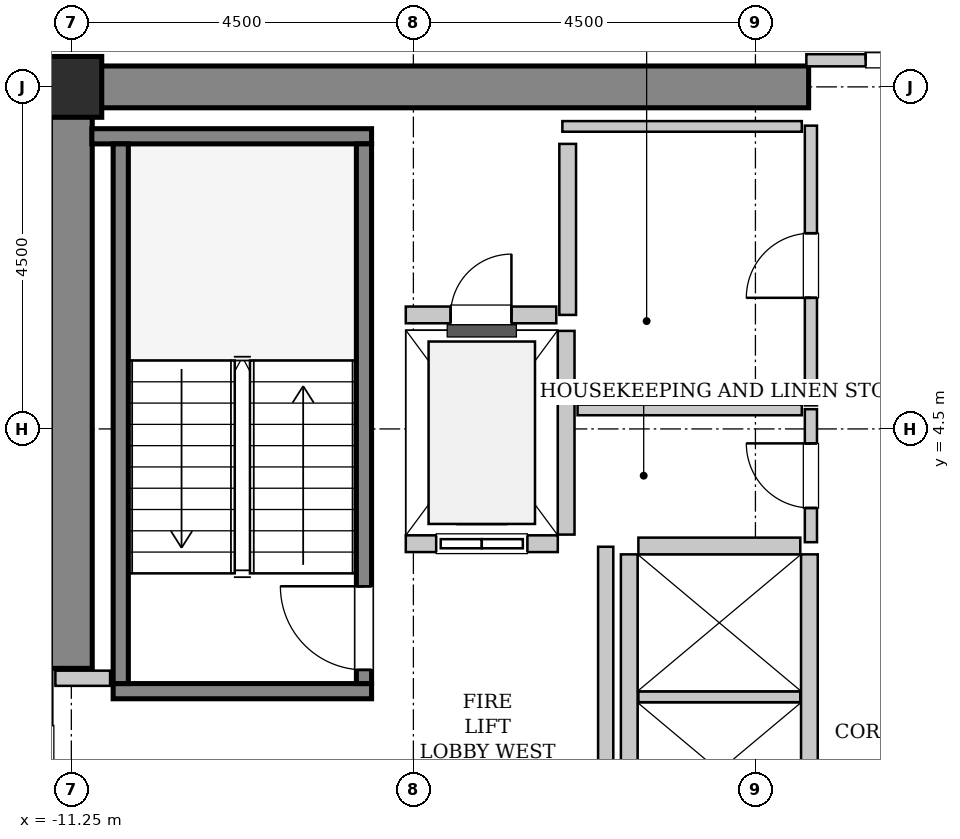
"""IFC4 building model, lengths in metres.
Left out: names, types, materials, properties, quantities, classifications, styles, units other than length and angle.
Written with IfcOpenShell. Run it as: python <this file> out.ifc"""

import sys

from ifc_helpers import new_model, si_unit, direction, frame, frame_2d, origin, origin_2d, place, context, subcontext, project, spatial, rectangle, hollow_rectangle, extrude, source, transform, mapped, element, fill, save


model = new_model("IFC4")
c1 = context("Model", 3, precision=1e-05, world=origin(), true_north=direction((0.0, 1.0)))
c2 = subcontext(c1, "Body", "Model", "MODEL_VIEW")
j1 = project(units=[si_unit("LENGTHUNIT", "METRE"), si_unit("PLANEANGLEUNIT", "RADIAN")], contexts=[c1])
p1 = place(None, origin())
s1 = spatial("IfcSite", under=j1, at=p1, CompositionType="ELEMENT")
p2 = place(p1, origin())
s2 = spatial("IfcBuilding", under=s1, at=p2, CompositionType="ELEMENT")
p3 = place(p2, frame((0.0, 0.0, 186.8)))
s3 = spatial("IfcBuildingStorey", under=s2, at=p3, CompositionType="ELEMENT", Elevation=186.8)
m1 = source(origin(), c2, "Body", "SweptSolid", [
    extrude(rectangle(XDim=9.975, YDim=0.55, at=frame_2d((4.987, 0.0))), origin(), (0.0, 0.0, 1.0), 3.8),
])
p4 = place(p3, frame((-11.525, 9.0, 0.0), z_axis=(0.0, 0.0, 1.0), x_axis=(1.0, 0.0, 0.0)))
e1 = element("IfcWall", 1, at=p4, inside=s3, PredefinedType="SHEAR", context=c2, shape_type="MappedRepresentation", body=[
    mapped(m1, transform((0.0, 0.0, 0.0), x_axis=(1.0, 0.0, 0.0), y_axis=(0.0, 1.0, 0.0), z_axis=(0.0, 0.0, 1.0), scale=1.0)),
])
m2 = source(origin(), c2, "Body", "SweptSolid", [
    extrude(rectangle(XDim=7.375, YDim=0.55, at=frame_2d((3.688, 0.0))), origin(), (0.0, 0.0, 1.0), 3.8),
])
p5 = place(p3, frame((-11.25, 1.35, 0.0), z_axis=(0.0, 0.0, 1.0), x_axis=(0.0, 1.0, 0.0)))
e2 = element("IfcWall", 2, at=p5, inside=s3, PredefinedType="SHEAR", context=c2, shape_type="MappedRepresentation", body=[
    mapped(m2, transform((0.0, 0.0, 0.0), x_axis=(1.0, 0.0, 0.0), y_axis=(0.0, 1.0, 0.0), z_axis=(0.0, 0.0, 1.0), scale=1.0)),
])
m3 = source(origin(), c2, "Body", "SweptSolid", [
    extrude(hollow_rectangle(XDim=0.8, YDim=0.8, WallThickness=0.04, InnerFilletRadius=0.04, OuterFilletRadius=0.08, at=origin_2d()), origin(), (0.0, 0.0, 1.0), 3.8),
])
p6 = place(p3, frame((-11.25, 9.0, 0.0), z_axis=(0.0, 0.0, 1.0), x_axis=(1.0, 0.0, 0.0)))
e3 = element("IfcColumn", 3, at=p6, inside=s3, PredefinedType="COLUMN", context=c2, shape_type="MappedRepresentation", body=[
    mapped(m3, transform((0.0, 0.0, 0.0), x_axis=(1.0, 0.0, 0.0), y_axis=(0.0, 1.0, 0.0), z_axis=(0.0, 0.0, 1.0), scale=1.0)),
])
m4 = source(origin(), c2, "Body", "SweptSolid", [
    extrude(rectangle(XDim=3.4, YDim=0.2, at=frame_2d((1.7, 0.0))), origin(), (0.0, 0.0, 1.0), 3.8),
])
p7 = place(p3, frame((-7.3, 1.05, 0.0), z_axis=(0.0, 0.0, 1.0), x_axis=(-1.0, 0.0, 0.0)))
e4 = element("IfcWall", 4, at=p7, inside=s3, PredefinedType="SOLIDWALL", context=c2, shape_type="MappedRepresentation", body=[
    mapped(m4, transform((0.0, 0.0, 0.0), x_axis=(1.0, 0.0, 0.0), y_axis=(0.0, 1.0, 0.0), z_axis=(0.0, 0.0, 1.0), scale=1.0)),
])
m5 = source(origin(), c2, "Body", "SweptSolid", [
    extrude(rectangle(XDim=3.68, YDim=0.2, at=frame_2d((1.84, 0.0))), origin(), (0.0, 0.0, 1.0), 3.8),
])
p8 = place(p3, frame((-7.3, 8.35, 0.0), z_axis=(0.0, 0.0, 1.0), x_axis=(-1.0, 0.0, 0.0)))
e5 = element("IfcWall", 5, at=p8, inside=s3, PredefinedType="SOLIDWALL", context=c2, shape_type="MappedRepresentation", body=[
    mapped(m5, transform((0.0, 0.0, 0.0), x_axis=(1.0, 0.0, 0.0), y_axis=(0.0, 1.0, 0.0), z_axis=(0.0, 0.0, 1.0), scale=1.0)),
])
m6 = source(origin(), c2, "Body", "SweptSolid", [
    extrude(rectangle(XDim=7.1, YDim=0.2, at=frame_2d((3.55, 0.0))), origin(), (0.0, 0.0, 1.0), 3.8),
])
p9 = place(p3, frame((-7.4, 1.15, 0.0), z_axis=(0.0, 0.0, 1.0), x_axis=(0.0, 1.0, 0.0)))
e6 = element("IfcWall", 6, at=p9, inside=s3, PredefinedType="SOLIDWALL", context=c2, shape_type="MappedRepresentation", body=[
    mapped(m6, transform((0.0, 0.0, 0.0), x_axis=(1.0, 0.0, 0.0), y_axis=(0.0, 1.0, 0.0), z_axis=(0.0, 0.0, 1.0), scale=1.0)),
])
p10 = place(p9, frame((0.18, 0.0, 0.0)))
e7 = element("IfcOpeningElement", 7, at=p10, cuts=e6, PredefinedType="OPENING", context=c2, shape_type="SweptSolid", body=[
    extrude(rectangle(XDim=1.1, YDim=2.15, at=frame_2d((0.55, 1.075))), frame((0.0, 0.11, 0.0), z_axis=(0.0, -1.0, 0.0), x_axis=(1.0, 0.0, 0.0)), (0.0, 0.0, 1.0), 0.22),
])
p11 = place(p3, frame((-10.6, 1.15, 0.0), z_axis=(0.0, 0.0, 1.0), x_axis=(0.0, 1.0, 0.0)))
e8 = element("IfcWall", 8, at=p11, inside=s3, PredefinedType="SOLIDWALL", context=c2, shape_type="MappedRepresentation", body=[
    mapped(m6, transform((0.0, 0.0, 0.0), x_axis=(1.0, 0.0, 0.0), y_axis=(0.0, 1.0, 0.0), z_axis=(0.0, 0.0, 1.0), scale=1.0)),
])
m7 = source(origin(), c2, "Body", "SweptSolid", [
    extrude(rectangle(XDim=2.0, YDim=0.22, at=frame_2d((1.0, 0.0))), origin(), (0.0, 0.0, 1.0), 3.535),
])
p12 = place(p3, frame((-6.85, 2.99, 0.0), z_axis=(0.0, 0.0, 1.0), x_axis=(1.0, 0.0, 0.0)))
e9 = element("IfcWall", 9, at=p12, inside=s3, PredefinedType="SOLIDWALL", context=c2, shape_type="MappedRepresentation", body=[
    mapped(m7, transform((0.0, 0.0, 0.0), x_axis=(1.0, 0.0, 0.0), y_axis=(0.0, 1.0, 0.0), z_axis=(0.0, 0.0, 1.0), scale=1.0)),
])
p13 = place(p12, frame((0.4, 0.0, 0.0)))
e10 = element("IfcOpeningElement", 10, at=p13, cuts=e9, PredefinedType="OPENING", context=c2, shape_type="SweptSolid", body=[
    extrude(rectangle(XDim=1.2, YDim=2.2, at=frame_2d((0.6, 1.1))), frame((0.0, 0.12, 0.0), z_axis=(0.0, -1.0, 0.0), x_axis=(1.0, 0.0, 0.0)), (0.0, 0.0, 1.0), 0.24),
])
m8 = source(origin(), c2, "Body", "SweptSolid", [
    extrude(rectangle(XDim=2.68, YDim=0.22, at=frame_2d((1.34, 0.0))), origin(), (0.0, 0.0, 1.0), 3.535),
])
p14 = place(p3, frame((-4.74, 3.11, 0.0), z_axis=(0.0, 0.0, 1.0), x_axis=(0.0, 1.0, 0.0)))
e11 = element("IfcWall", 11, at=p14, inside=s3, PredefinedType="SOLIDWALL", context=c2, shape_type="MappedRepresentation", body=[
    mapped(m8, transform((0.0, 0.0, 0.0), x_axis=(1.0, 0.0, 0.0), y_axis=(0.0, 1.0, 0.0), z_axis=(0.0, 0.0, 1.0), scale=1.0)),
])
m9 = source(origin(), c2, "Body", "SweptSolid", [
    extrude(rectangle(XDim=5.7, YDim=0.22, at=frame_2d((2.85, 0.0))), origin(), (0.0, 0.0, 1.0), 3.535),
])
for number, where, z_axis, x_axis in (
    (12, (-1.54, -2.85, 0.0), (0.0, 0.0, 1.0), (0.0, 1.0, 0.0)),
    (13, (-3.91, 2.85, 0.0), (0.0, 0.0, 1.0), (0.0, -1.0, 0.0)),
):
    element("IfcWall", number, at=place(p3, frame(where, z_axis=z_axis, x_axis=x_axis)), inside=s3, PredefinedType="SOLIDWALL", context=c2, shape_type="MappedRepresentation", body=[
        mapped(m9, transform((0.0, 0.0, 0.0), x_axis=(1.0, 0.0, 0.0), y_axis=(0.0, 1.0, 0.0), z_axis=(0.0, 0.0, 1.0), scale=1.0)),
    ])
m10 = source(origin(), c2, "Body", "SweptSolid", [
    extrude(rectangle(XDim=2.13, YDim=0.14, at=frame_2d((1.065, 0.0))), origin(), (0.0, 0.0, 1.0), 3.535),
])
p15 = place(p3, frame((-3.79, 0.975, 0.0), z_axis=(0.0, 0.0, 1.0), x_axis=(1.0, 0.0, 0.0)))
e14 = element("IfcWall", 14, at=p15, inside=s3, PredefinedType="PARTITIONING", context=c2, shape_type="MappedRepresentation", body=[
    mapped(m10, transform((0.0, 0.0, 0.0), x_axis=(1.0, 0.0, 0.0), y_axis=(0.0, 1.0, 0.0), z_axis=(0.0, 0.0, 1.0), scale=1.0)),
])
m11 = source(origin(), c2, "Body", "SweptSolid", [
    extrude(rectangle(XDim=2.13, YDim=0.22, at=frame_2d((1.065, 0.0))), origin(), (0.0, 0.0, 1.0), 3.535),
])
p16 = place(p3, frame((-1.66, 2.96, 0.0), z_axis=(0.0, 0.0, 1.0), x_axis=(-1.0, 0.0, 0.0)))
e15 = element("IfcWall", 15, at=p16, inside=s3, PredefinedType="SOLIDWALL", context=c2, shape_type="MappedRepresentation", body=[
    mapped(m11, transform((0.0, 0.0, 0.0), x_axis=(1.0, 0.0, 0.0), y_axis=(0.0, 1.0, 0.0), z_axis=(0.0, 0.0, 1.0), scale=1.0)),
])
m12 = source(origin(), c2, "Body", "SweptSolid", [
    extrude(rectangle(XDim=2.25, YDim=0.22, at=frame_2d((1.125, 0.0))), origin(), (0.0, 0.0, 1.0), 3.535),
])
p17 = place(p3, frame((-4.72, 6.0, 0.0), z_axis=(0.0, 0.0, 1.0), x_axis=(0.0, 1.0, 0.0)))
e16 = element("IfcWall", 16, at=p17, inside=s3, PredefinedType="SOLIDWALL", context=c2, shape_type="MappedRepresentation", body=[
    mapped(m12, transform((0.0, 0.0, 0.0), x_axis=(1.0, 0.0, 0.0), y_axis=(0.0, 1.0, 0.0), z_axis=(0.0, 0.0, 1.0), scale=1.0)),
])
m13 = source(origin(), c2, "Body", "SweptSolid", [
    extrude(rectangle(XDim=1.98, YDim=0.22, at=frame_2d((0.99, 0.0))), origin(), (0.0, 0.0, 1.0), 3.535),
])
p18 = place(p3, frame((-6.85, 6.0, 0.0), z_axis=(0.0, 0.0, 1.0), x_axis=(1.0, 0.0, 0.0)))
e17 = element("IfcWall", 17, at=p18, inside=s3, PredefinedType="SOLIDWALL", context=c2, shape_type="MappedRepresentation", body=[
    mapped(m13, transform((0.0, 0.0, 0.0), x_axis=(1.0, 0.0, 0.0), y_axis=(0.0, 1.0, 0.0), z_axis=(0.0, 0.0, 1.0), scale=1.0)),
])
p19 = place(p18, frame((0.59, 0.0, 0.0)))
e18 = element("IfcOpeningElement", 18, at=p19, cuts=e17, PredefinedType="OPENING", context=c2, shape_type="SweptSolid", body=[
    extrude(rectangle(XDim=0.8, YDim=2.0, at=frame_2d((0.4, 1.0))), frame((0.0, 0.12, 0.0), z_axis=(0.0, -1.0, 0.0), x_axis=(1.0, 0.0, 0.0)), (0.0, 0.0, 1.0), 0.24),
])
m14 = source(origin(), c2, "Body", "SweptSolid", [
    extrude(rectangle(XDim=5.9, YDim=0.2, at=frame_2d((2.95, 0.0))), origin(), (0.0, 0.0, 1.0), 3.535),
])
p20 = place(p3, frame((-4.22, -2.95, 0.0), z_axis=(0.0, 0.0, 1.0), x_axis=(0.0, 1.0, 0.0)))
e19 = element("IfcWall", 19, at=p20, inside=s3, PredefinedType="PARTITIONING", context=c2, shape_type="MappedRepresentation", body=[
    mapped(m14, transform((0.0, 0.0, 0.0), x_axis=(1.0, 0.0, 0.0), y_axis=(0.0, 1.0, 0.0), z_axis=(0.0, 0.0, 1.0), scale=1.0)),
])
m15 = source(origin(), c2, "Body", "SweptSolid", [
    extrude(rectangle(XDim=0.72, YDim=0.2, at=frame_2d((0.36, 0.0))), origin(), (0.0, 0.0, 1.0), 3.535),
])
p21 = place(p3, frame((-11.46, 1.22, 0.0), z_axis=(0.0, 0.0, 1.0), x_axis=(1.0, 0.0, 0.0)))
e20 = element("IfcWall", 20, at=p21, inside=s3, PredefinedType="PARTITIONING", context=c2, shape_type="MappedRepresentation", body=[
    mapped(m15, transform((0.0, 0.0, 0.0), x_axis=(1.0, 0.0, 0.0), y_axis=(0.0, 1.0, 0.0), z_axis=(0.0, 0.0, 1.0), scale=1.0)),
])
m16 = source(origin(), c2, "Body", "SweptSolid", [
    extrude(rectangle(XDim=3.16, YDim=0.16, at=frame_2d((1.58, 0.0))), origin(), (0.0, 0.0, 1.0), 2.425),
])
p22 = place(p3, frame((-1.58, 9.35, 0.0), z_axis=(0.0, 0.0, 1.0), x_axis=(1.0, 0.0, 0.0)))
e21 = element("IfcWall", 21, at=p22, inside=s3, PredefinedType="PARTITIONING", context=c2, shape_type="MappedRepresentation", body=[
    mapped(m16, transform((0.0, 0.0, 0.0), x_axis=(1.0, 0.0, 0.0), y_axis=(0.0, 1.0, 0.0), z_axis=(0.0, 0.0, 1.0), scale=1.0)),
])
p23 = place(p22, frame((0.78, 0.0, 0.0)))
e22 = element("IfcOpeningElement", 22, at=p23, cuts=e21, PredefinedType="OPENING", context=c2, shape_type="SweptSolid", body=[
    extrude(rectangle(XDim=1.6, YDim=2.3, at=frame_2d((0.8, 1.15))), frame((0.0, 0.09, 0.0), z_axis=(0.0, -1.0, 0.0), x_axis=(1.0, 0.0, 0.0)), (0.0, 0.0, 1.0), 0.18),
])
m17 = source(origin(), c2, "Body", "SweptSolid", [
    extrude(rectangle(XDim=1.75, YDim=0.16, at=frame_2d((0.875, 0.0))), origin(), (0.0, 0.0, 1.0), 3.535),
])
p24 = place(p3, frame((-1.52, 3.01, 0.0), z_axis=(0.0, 0.0, 1.0), x_axis=(0.0, 1.0, 0.0)))
e23 = element("IfcWall", 23, at=p24, inside=s3, PredefinedType="PARTITIONING", context=c2, shape_type="MappedRepresentation", body=[
    mapped(m17, transform((0.0, 0.0, 0.0), x_axis=(1.0, 0.0, 0.0), y_axis=(0.0, 1.0, 0.0), z_axis=(0.0, 0.0, 1.0), scale=1.0)),
])
p25 = place(p24, frame((0.45, 0.0, 0.0)))
e24 = element("IfcOpeningElement", 24, at=p25, cuts=e23, PredefinedType="OPENING", context=c2, shape_type="SweptSolid", body=[
    extrude(rectangle(XDim=0.85, YDim=2.1, at=frame_2d((0.425, 1.05))), frame((0.0, 0.09, 0.0), z_axis=(0.0, -1.0, 0.0), x_axis=(1.0, 0.0, 0.0)), (0.0, 0.0, 1.0), 0.18),
])
m18 = source(origin(), c2, "Body", "SweptSolid", [
    extrude(rectangle(XDim=2.95, YDim=0.14, at=frame_2d((1.475, 0.0))), origin(), (0.0, 0.0, 1.0), 3.535),
])
p26 = place(p3, frame((-4.59, 4.75, 0.0), z_axis=(0.0, 0.0, 1.0), x_axis=(1.0, 0.0, 0.0)))
e25 = element("IfcWall", 25, at=p26, inside=s3, PredefinedType="PARTITIONING", context=c2, shape_type="MappedRepresentation", body=[
    mapped(m18, transform((0.0, 0.0, 0.0), x_axis=(1.0, 0.0, 0.0), y_axis=(0.0, 1.0, 0.0), z_axis=(0.0, 0.0, 1.0), scale=1.0)),
])
m19 = source(origin(), c2, "Body", "SweptSolid", [
    extrude(rectangle(XDim=3.68, YDim=0.16, at=frame_2d((1.84, 0.0))), origin(), (0.0, 0.0, 1.0), 3.535),
])
p27 = place(p3, frame((-1.52, 4.81, 0.0), z_axis=(0.0, 0.0, 1.0), x_axis=(0.0, 1.0, 0.0)))
e26 = element("IfcWall", 26, at=p27, inside=s3, PredefinedType="PARTITIONING", context=c2, shape_type="MappedRepresentation", body=[
    mapped(m19, transform((0.0, 0.0, 0.0), x_axis=(1.0, 0.0, 0.0), y_axis=(0.0, 1.0, 0.0), z_axis=(0.0, 0.0, 1.0), scale=1.0)),
])
p28 = place(p27, frame((1.415, 0.0, 0.0)))
e27 = element("IfcOpeningElement", 27, at=p28, cuts=e26, PredefinedType="OPENING", context=c2, shape_type="SweptSolid", body=[
    extrude(rectangle(XDim=0.85, YDim=2.1, at=frame_2d((0.425, 1.05))), frame((0.0, 0.09, 0.0), z_axis=(0.0, -1.0, 0.0), x_axis=(1.0, 0.0, 0.0)), (0.0, 0.0, 1.0), 0.18),
])
m20 = source(origin(), c2, "Body", "SweptSolid", [
    extrude(rectangle(XDim=3.15, YDim=0.14, at=frame_2d((1.575, 0.0))), origin(), (0.0, 0.0, 1.0), 3.535),
])
p29 = place(p3, frame((-4.79, 8.48, 0.0), z_axis=(0.0, 0.0, 1.0), x_axis=(1.0, 0.0, 0.0)))
e28 = element("IfcWall", 28, at=p29, inside=s3, PredefinedType="PARTITIONING", context=c2, shape_type="MappedRepresentation", body=[
    mapped(m20, transform((0.0, 0.0, 0.0), x_axis=(1.0, 0.0, 0.0), y_axis=(0.0, 1.0, 0.0), z_axis=(0.0, 0.0, 1.0), scale=1.0)),
])
m21 = source(origin(), c2, "Body", "SweptSolid", [
    extrude(rectangle(XDim=1.1, YDim=2.15, at=frame_2d((0.55, 1.075))), frame((0.0, 0.025, 0.0), z_axis=(0.0, -1.0, 0.0), x_axis=(1.0, 0.0, 0.0)), (0.0, 0.0, 1.0), 0.05),
])
p30 = place(p10, origin())
e29 = element("IfcDoor", 29, at=p30, inside=s3, OperationType="SINGLE_SWING_RIGHT", PredefinedType="DOOR", context=c2, shape_type="MappedRepresentation", body=[
    mapped(m21, transform((0.0, 0.0, 0.0), x_axis=(1.0, 0.0, 0.0), y_axis=(0.0, 1.0, 0.0), z_axis=(0.0, 0.0, 1.0), scale=1.0)),
])
fill(e7, e29)
m22 = source(origin(), c2, "Body", "SweptSolid", [
    extrude(rectangle(XDim=1.2, YDim=2.2, at=frame_2d((0.6, 1.1))), frame((0.0, 0.025, 0.0), z_axis=(0.0, -1.0, 0.0), x_axis=(1.0, 0.0, 0.0)), (0.0, 0.0, 1.0), 0.05),
])
p31 = place(p13, origin())
e30 = element("IfcDoor", 30, at=p31, inside=s3, OperationType="SLIDING_TO_LEFT", PredefinedType="DOOR", context=c2, shape_type="MappedRepresentation", body=[
    mapped(m22, transform((0.0, 0.0, 0.0), x_axis=(1.0, 0.0, 0.0), y_axis=(0.0, 1.0, 0.0), z_axis=(0.0, 0.0, 1.0), scale=1.0)),
])
fill(e10, e30)
m23 = source(origin(), c2, "Body", "SweptSolid", [
    extrude(rectangle(XDim=0.8, YDim=2.0, at=frame_2d((0.4, 1.0))), frame((0.0, 0.025, 0.0), z_axis=(0.0, -1.0, 0.0), x_axis=(1.0, 0.0, 0.0)), (0.0, 0.0, 1.0), 0.05),
])
p32 = place(p19, origin())
e31 = element("IfcDoor", 31, at=p32, inside=s3, OperationType="SINGLE_SWING_RIGHT", PredefinedType="TRAPDOOR", context=c2, shape_type="MappedRepresentation", body=[
    mapped(m23, transform((0.0, 0.0, 0.0), x_axis=(1.0, 0.0, 0.0), y_axis=(0.0, 1.0, 0.0), z_axis=(0.0, 0.0, 1.0), scale=1.0)),
])
fill(e18, e31)
m24 = source(origin(), c2, "Body", "SweptSolid", [
    extrude(rectangle(XDim=1.6, YDim=2.3, at=frame_2d((0.8, 1.15))), frame((0.0, 0.025, 0.0), z_axis=(0.0, -1.0, 0.0), x_axis=(1.0, 0.0, 0.0)), (0.0, 0.0, 1.0), 0.05),
])
p33 = place(p23, origin())
e32 = element("IfcDoor", 32, at=p33, inside=s3, OperationType="DOUBLE_DOOR_SINGLE_SWING", PredefinedType="DOOR", context=c2, shape_type="MappedRepresentation", body=[
    mapped(m24, transform((0.0, 0.0, 0.0), x_axis=(1.0, 0.0, 0.0), y_axis=(0.0, 1.0, 0.0), z_axis=(0.0, 0.0, 1.0), scale=1.0)),
])
fill(e22, e32)
m25 = source(origin(), c2, "Body", "SweptSolid", [
    extrude(rectangle(XDim=0.85, YDim=2.1, at=frame_2d((0.425, 1.05))), frame((0.0, 0.025, 0.0), z_axis=(0.0, -1.0, 0.0), x_axis=(1.0, 0.0, 0.0)), (0.0, 0.0, 1.0), 0.05),
])
p34 = place(p25, origin())
e33 = element("IfcDoor", 33, at=p34, inside=s3, OperationType="SINGLE_SWING_RIGHT", PredefinedType="DOOR", context=c2, shape_type="MappedRepresentation", body=[
    mapped(m25, transform((0.0, 0.0, 0.0), x_axis=(1.0, 0.0, 0.0), y_axis=(0.0, 1.0, 0.0), z_axis=(0.0, 0.0, 1.0), scale=1.0)),
])
fill(e24, e33)
p35 = place(p28, origin())
e34 = element("IfcDoor", 34, at=p35, inside=s3, OperationType="SINGLE_SWING_LEFT", PredefinedType="DOOR", context=c2, shape_type="MappedRepresentation", body=[
    mapped(m25, transform((0.0, 0.0, 0.0), x_axis=(1.0, 0.0, 0.0), y_axis=(0.0, 1.0, 0.0), z_axis=(0.0, 0.0, 1.0), scale=1.0)),
])
fill(e27, e34)
save(model, sys.argv[1])
